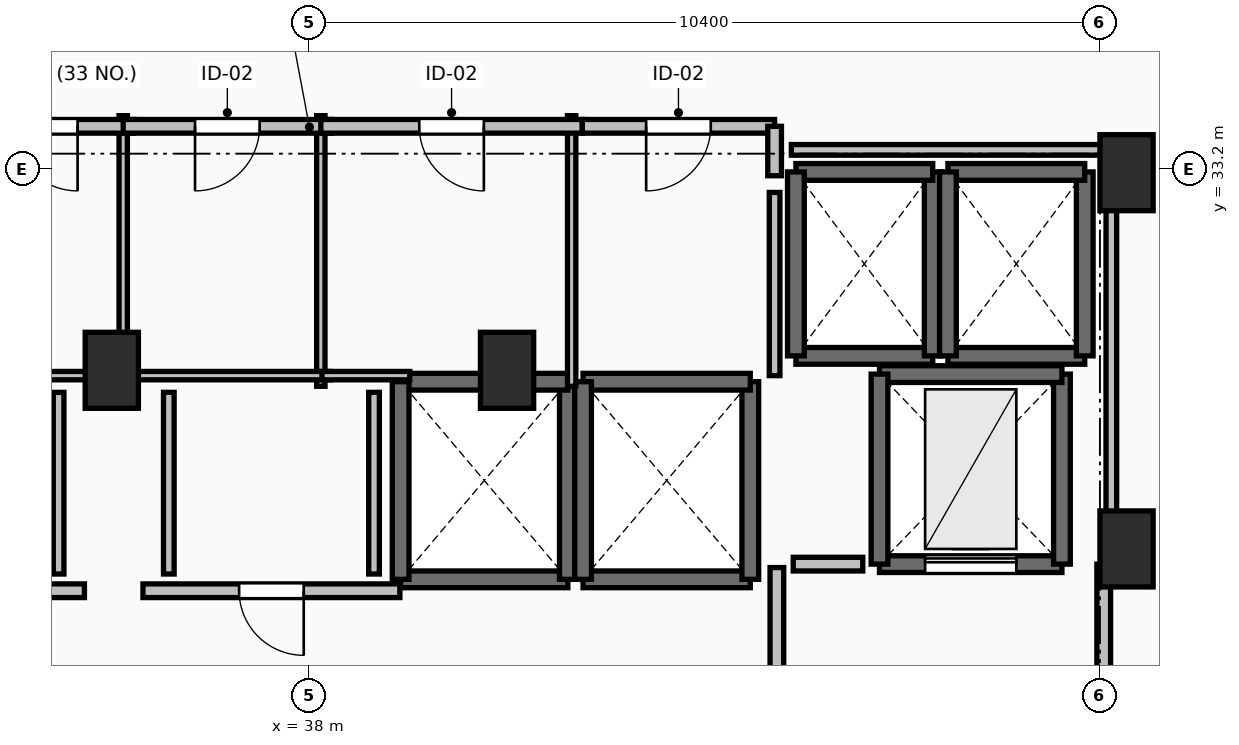
"""IFC4 building model, lengths in metres.
Left out: names, types, materials, properties, quantities, classifications, styles, units other than length and angle.
Written with IfcOpenShell. Run it as: python <this file> out.ifc"""

import sys

from ifc_helpers import new_model, si_unit, direction, frame, frame_2d, origin, origin_2d, place, context, subcontext, project, spatial, rectangle, extrude, element, fill, save


model = new_model("IFC4")
c1 = context("Model", 3, precision=1e-05, world=origin(), true_north=direction((0.0, 1.0)))
c2 = subcontext(c1, "Body", "Model", "MODEL_VIEW")
j1 = project(units=[si_unit("LENGTHUNIT", "METRE"), si_unit("PLANEANGLEUNIT", "RADIAN")], contexts=[c1])
p1 = place(None, origin())
s1 = spatial("IfcSite", under=j1, at=p1, CompositionType="ELEMENT")
p2 = place(p1, origin())
s2 = spatial("IfcBuilding", under=s1, at=p2, CompositionType="ELEMENT")
p3 = place(p2, frame((0.0, 0.0, 217.85)))
s3 = spatial("IfcBuildingStorey", under=s2, at=p3, CompositionType="ELEMENT", Elevation=217.85)
for number, where, z_axis, x_axis in (
    (1, (48.75, 33.15, 0.0), (0.0, 0.0, 1.0), (1.0, 0.0, 0.0)),
    (2, (48.75, 28.2, 0.0), (0.0, 0.0, 1.0), (1.0, 0.0, 0.0)),
    (3, (35.4, 30.55, 0.0), (0.0, 0.0, 1.0), (1.0, 0.0, 0.0)),
    (4, (40.6, 30.55, 0.0), (0.0, 0.0, 1.0), (1.0, 0.0, 0.0)),
):
    element("IfcColumn", number, at=place(p3, frame(where, z_axis=z_axis, x_axis=x_axis)), inside=s3, PredefinedType="PILASTER", context=c2, shape_type="SweptSolid", body=[
        extrude(rectangle(XDim=0.7, YDim=1.0, at=origin_2d()), origin(), (0.0, 0.0, 1.0), 3.55),
    ])
p4 = place(p3, frame((39.2, 27.8, 0.0), z_axis=(0.0, 0.0, 1.0), x_axis=(1.0, 0.0, 0.0)))
e5 = element("IfcWall", 5, at=p4, inside=s3, PredefinedType="SOLIDWALL", context=c2, shape_type="SweptSolid", body=[
    extrude(rectangle(XDim=2.2, YDim=0.22, at=frame_2d((1.1, 0.0))), origin(), (0.0, 0.0, 1.0), 3.29),
])
p5 = place(p3, frame((41.4, 27.8, 0.0), z_axis=(0.0, 0.0, 1.0), x_axis=(0.0, 1.0, 0.0)))
e6 = element("IfcWall", 6, at=p5, inside=s3, PredefinedType="SOLIDWALL", context=c2, shape_type="SweptSolid", body=[
    extrude(rectangle(XDim=2.6, YDim=0.22, at=frame_2d((1.3, 0.0))), origin(), (0.0, 0.0, 1.0), 3.29),
])
p6 = place(p3, frame((41.4, 30.4, 0.0), z_axis=(0.0, 0.0, 1.0), x_axis=(-1.0, 0.0, 0.0)))
e7 = element("IfcWall", 7, at=p6, inside=s3, PredefinedType="SOLIDWALL", context=c2, shape_type="SweptSolid", body=[
    extrude(rectangle(XDim=2.2, YDim=0.22, at=frame_2d((1.1, 0.0))), origin(), (0.0, 0.0, 1.0), 3.29),
])
p7 = place(p3, frame((39.2, 30.4, 0.0), z_axis=(0.0, 0.0, 1.0), x_axis=(0.0, -1.0, 0.0)))
e8 = element("IfcWall", 8, at=p7, inside=s3, PredefinedType="SOLIDWALL", context=c2, shape_type="SweptSolid", body=[
    extrude(rectangle(XDim=2.6, YDim=0.22, at=frame_2d((1.3, 0.0))), origin(), (0.0, 0.0, 1.0), 3.29),
])
p8 = place(p3, frame((41.6, 27.8, 0.0), z_axis=(0.0, 0.0, 1.0), x_axis=(1.0, 0.0, 0.0)))
e9 = element("IfcWall", 9, at=p8, inside=s3, PredefinedType="SOLIDWALL", context=c2, shape_type="SweptSolid", body=[
    extrude(rectangle(XDim=2.2, YDim=0.22, at=frame_2d((1.1, 0.0))), origin(), (0.0, 0.0, 1.0), 3.29),
])
p9 = place(p3, frame((43.8, 27.8, 0.0), z_axis=(0.0, 0.0, 1.0), x_axis=(0.0, 1.0, 0.0)))
e10 = element("IfcWall", 10, at=p9, inside=s3, PredefinedType="SOLIDWALL", context=c2, shape_type="SweptSolid", body=[
    extrude(rectangle(XDim=2.6, YDim=0.22, at=frame_2d((1.3, 0.0))), origin(), (0.0, 0.0, 1.0), 3.29),
])
p10 = place(p3, frame((43.8, 30.4, 0.0), z_axis=(0.0, 0.0, 1.0), x_axis=(-1.0, 0.0, 0.0)))
e11 = element("IfcWall", 11, at=p10, inside=s3, PredefinedType="SOLIDWALL", context=c2, shape_type="SweptSolid", body=[
    extrude(rectangle(XDim=2.2, YDim=0.22, at=frame_2d((1.1, 0.0))), origin(), (0.0, 0.0, 1.0), 3.29),
])
p11 = place(p3, frame((41.6, 30.4, 0.0), z_axis=(0.0, 0.0, 1.0), x_axis=(0.0, -1.0, 0.0)))
e12 = element("IfcWall", 12, at=p11, inside=s3, PredefinedType="SOLIDWALL", context=c2, shape_type="SweptSolid", body=[
    extrude(rectangle(XDim=2.6, YDim=0.22, at=frame_2d((1.3, 0.0))), origin(), (0.0, 0.0, 1.0), 3.29),
])
p12 = place(p3, frame((44.4, 30.74, 0.0), z_axis=(0.0, 0.0, 1.0), x_axis=(1.0, 0.0, 0.0)))
e13 = element("IfcWall", 13, at=p12, inside=s3, PredefinedType="SOLIDWALL", context=c2, shape_type="SweptSolid", body=[
    extrude(rectangle(XDim=1.8, YDim=0.22, at=frame_2d((0.9, 0.0))), origin(), (0.0, 0.0, 1.0), 3.29),
])
p13 = place(p3, frame((46.2, 30.74, 0.0), z_axis=(0.0, 0.0, 1.0), x_axis=(0.0, 1.0, 0.0)))
e14 = element("IfcWall", 14, at=p13, inside=s3, PredefinedType="SOLIDWALL", context=c2, shape_type="SweptSolid", body=[
    extrude(rectangle(XDim=2.42, YDim=0.22, at=frame_2d((1.21, 0.0))), origin(), (0.0, 0.0, 1.0), 3.29),
])
p14 = place(p3, frame((46.2, 33.16, 0.0), z_axis=(0.0, 0.0, 1.0), x_axis=(-1.0, 0.0, 0.0)))
e15 = element("IfcWall", 15, at=p14, inside=s3, PredefinedType="SOLIDWALL", context=c2, shape_type="SweptSolid", body=[
    extrude(rectangle(XDim=1.8, YDim=0.22, at=frame_2d((0.9, 0.0))), origin(), (0.0, 0.0, 1.0), 3.29),
])
p15 = place(p3, frame((44.4, 33.16, 0.0), z_axis=(0.0, 0.0, 1.0), x_axis=(0.0, -1.0, 0.0)))
e16 = element("IfcWall", 16, at=p15, inside=s3, PredefinedType="SOLIDWALL", context=c2, shape_type="SweptSolid", body=[
    extrude(rectangle(XDim=2.42, YDim=0.22, at=frame_2d((1.21, 0.0))), origin(), (0.0, 0.0, 1.0), 3.29),
])
p16 = place(p3, frame((46.4, 30.74, 0.0), z_axis=(0.0, 0.0, 1.0), x_axis=(1.0, 0.0, 0.0)))
e17 = element("IfcWall", 17, at=p16, inside=s3, PredefinedType="SOLIDWALL", context=c2, shape_type="SweptSolid", body=[
    extrude(rectangle(XDim=1.8, YDim=0.22, at=frame_2d((0.9, 0.0))), origin(), (0.0, 0.0, 1.0), 3.29),
])
p17 = place(p3, frame((48.2, 30.74, 0.0), z_axis=(0.0, 0.0, 1.0), x_axis=(0.0, 1.0, 0.0)))
e18 = element("IfcWall", 18, at=p17, inside=s3, PredefinedType="SOLIDWALL", context=c2, shape_type="SweptSolid", body=[
    extrude(rectangle(XDim=2.42, YDim=0.22, at=frame_2d((1.21, 0.0))), origin(), (0.0, 0.0, 1.0), 3.29),
])
p18 = place(p3, frame((48.2, 33.16, 0.0), z_axis=(0.0, 0.0, 1.0), x_axis=(-1.0, 0.0, 0.0)))
e19 = element("IfcWall", 19, at=p18, inside=s3, PredefinedType="SOLIDWALL", context=c2, shape_type="SweptSolid", body=[
    extrude(rectangle(XDim=1.8, YDim=0.22, at=frame_2d((0.9, 0.0))), origin(), (0.0, 0.0, 1.0), 3.29),
])
p19 = place(p3, frame((46.4, 33.16, 0.0), z_axis=(0.0, 0.0, 1.0), x_axis=(0.0, -1.0, 0.0)))
e20 = element("IfcWall", 20, at=p19, inside=s3, PredefinedType="SOLIDWALL", context=c2, shape_type="SweptSolid", body=[
    extrude(rectangle(XDim=2.42, YDim=0.22, at=frame_2d((1.21, 0.0))), origin(), (0.0, 0.0, 1.0), 3.29),
])
p20 = place(p3, frame((45.5, 28.0, 0.0), z_axis=(0.0, 0.0, 1.0), x_axis=(1.0, 0.0, 0.0)))
e21 = element("IfcWall", 21, at=p20, inside=s3, PredefinedType="SHEAR", context=c2, shape_type="SweptSolid", body=[
    extrude(rectangle(XDim=2.4, YDim=0.22, at=frame_2d((1.2, 0.0))), origin(), (0.0, 0.0, 1.0), 3.29),
])
p21 = place(p20, frame((0.6, 0.0, 0.0)))
e22 = element("IfcOpeningElement", 22, at=p21, cuts=e21, PredefinedType="OPENING", context=c2, shape_type="SweptSolid", body=[
    extrude(rectangle(XDim=1.2, YDim=2.2, at=frame_2d((0.6, 1.1))), frame((0.0, 0.125, 0.0), z_axis=(0.0, -1.0, 0.0), x_axis=(1.0, 0.0, 0.0)), (0.0, 0.0, 1.0), 0.25),
])
p22 = place(p3, frame((47.9, 28.0, 0.0), z_axis=(0.0, 0.0, 1.0), x_axis=(0.0, 1.0, 0.0)))
e23 = element("IfcWall", 23, at=p22, inside=s3, PredefinedType="SHEAR", context=c2, shape_type="SweptSolid", body=[
    extrude(rectangle(XDim=2.5, YDim=0.22, at=frame_2d((1.25, 0.0))), origin(), (0.0, 0.0, 1.0), 3.29),
])
p23 = place(p3, frame((47.9, 30.5, 0.0), z_axis=(0.0, 0.0, 1.0), x_axis=(-1.0, 0.0, 0.0)))
e24 = element("IfcWall", 24, at=p23, inside=s3, PredefinedType="SHEAR", context=c2, shape_type="SweptSolid", body=[
    extrude(rectangle(XDim=2.4, YDim=0.22, at=frame_2d((1.2, 0.0))), origin(), (0.0, 0.0, 1.0), 3.29),
])
p24 = place(p3, frame((45.5, 30.5, 0.0), z_axis=(0.0, 0.0, 1.0), x_axis=(0.0, -1.0, 0.0)))
e25 = element("IfcWall", 25, at=p24, inside=s3, PredefinedType="SHEAR", context=c2, shape_type="SweptSolid", body=[
    extrude(rectangle(XDim=2.5, YDim=0.22, at=frame_2d((1.25, 0.0))), origin(), (0.0, 0.0, 1.0), 3.29),
])
p25 = place(p3, frame((44.15, 27.955, 0.0), z_axis=(0.0, 0.0, 1.0), x_axis=(0.0, -1.0, 0.0)))
e26 = element("IfcWall", 26, at=p25, inside=s3, PredefinedType="PARTITIONING", context=c2, shape_type="SweptSolid", body=[
    extrude(rectangle(XDim=3.91, YDim=0.18, at=frame_2d((1.955, 0.0))), origin(), (0.0, 0.0, 1.0), 3.29),
])
p26 = place(p25, frame((1.355, 0.0, 0.0)))
e27 = element("IfcOpeningElement", 27, at=p26, cuts=e26, PredefinedType="OPENING", context=c2, shape_type="SweptSolid", body=[
    extrude(rectangle(XDim=1.2, YDim=2.15, at=frame_2d((0.6, 1.075))), frame((0.0, 0.105, 0.0), z_axis=(0.0, -1.0, 0.0), x_axis=(1.0, 0.0, 0.0)), (0.0, 0.0, 1.0), 0.21),
])
p27 = place(p3, frame((48.45, 23.95, 0.0), z_axis=(0.0, 0.0, 1.0), x_axis=(0.0, 1.0, 0.0)))
e28 = element("IfcWall", 28, at=p27, inside=s3, PredefinedType="PARTITIONING", context=c2, shape_type="SweptSolid", body=[
    extrude(rectangle(XDim=4.05, YDim=0.18, at=frame_2d((2.025, 0.0))), origin(), (0.0, 0.0, 1.0), 3.29),
])
p28 = place(p27, frame((1.425, 0.0, 0.0)))
e29 = element("IfcOpeningElement", 29, at=p28, cuts=e28, PredefinedType="OPENING", context=c2, shape_type="SweptSolid", body=[
    extrude(rectangle(XDim=1.2, YDim=2.15, at=frame_2d((0.6, 1.075))), frame((0.0, 0.105, 0.0), z_axis=(0.0, -1.0, 0.0), x_axis=(1.0, 0.0, 0.0)), (0.0, 0.0, 1.0), 0.21),
])
p29 = place(p3, frame((35.04, 27.65, 0.0), z_axis=(0.0, 0.0, 1.0), x_axis=(-1.0, 0.0, 0.0)))
e30 = element("IfcWall", 30, at=p29, inside=s3, PredefinedType="PARTITIONING", context=c2, shape_type="SweptSolid", body=[
    extrude(rectangle(XDim=3.04, YDim=0.18, at=frame_2d((1.52, 0.0))), origin(), (0.0, 0.0, 1.0), 3.29),
])
p30 = place(p29, frame((1.02, 0.0, 0.0)))
e31 = element("IfcOpeningElement", 31, at=p30, cuts=e30, PredefinedType="OPENING", context=c2, shape_type="SweptSolid", body=[
    extrude(rectangle(XDim=1.0, YDim=2.15, at=frame_2d((0.5, 1.075))), frame((0.0, 0.105, 0.0), z_axis=(0.0, -1.0, 0.0), x_axis=(1.0, 0.0, 0.0)), (0.0, 0.0, 1.0), 0.21),
])
p31 = place(p3, frame((39.19, 27.65, 0.0), z_axis=(0.0, 0.0, 1.0), x_axis=(-1.0, 0.0, 0.0)))
e32 = element("IfcWall", 32, at=p31, inside=s3, PredefinedType="PARTITIONING", context=c2, shape_type="SweptSolid", body=[
    extrude(rectangle(XDim=3.38, YDim=0.18, at=frame_2d((1.69, 0.0))), origin(), (0.0, 0.0, 1.0), 3.29),
])
p32 = place(p31, frame((1.265, 0.0, 0.0)))
e33 = element("IfcOpeningElement", 33, at=p32, cuts=e32, PredefinedType="OPENING", context=c2, shape_type="SweptSolid", body=[
    extrude(rectangle(XDim=0.85, YDim=2.1, at=frame_2d((0.425, 1.05))), frame((0.0, 0.105, 0.0), z_axis=(0.0, -1.0, 0.0), x_axis=(1.0, 0.0, 0.0)), (0.0, 0.0, 1.0), 0.21),
])
p33 = place(p3, frame((35.55, 30.34, 0.0), z_axis=(0.0, 0.0, 1.0), x_axis=(0.0, 1.0, 0.0)))
e34 = element("IfcWall", 34, at=p33, inside=s3, PredefinedType="PARTITIONING", context=c2, shape_type="SweptSolid", body=[
    extrude(rectangle(XDim=3.56, YDim=0.11, at=frame_2d((1.78, 0.0))), origin(), (0.0, 0.0, 1.0), 2.482),
])
p34 = place(p3, frame((33.36, 30.48, 0.0), z_axis=(0.0, 0.0, 1.0), x_axis=(1.0, 0.0, 0.0)))
e35 = element("IfcWall", 35, at=p34, inside=s3, PredefinedType="PARTITIONING", context=c2, shape_type="SweptSolid", body=[
    extrude(rectangle(XDim=1.81, YDim=0.11, at=frame_2d((0.905, 0.0))), origin(), (0.0, 0.0, 1.0), 3.29),
])
p35 = place(p3, frame((35.69, 33.76, 0.0), z_axis=(0.0, 0.0, 1.0), x_axis=(-1.0, 0.0, 0.0)))
e36 = element("IfcWall", 36, at=p35, inside=s3, PredefinedType="PARTITIONING", context=c2, shape_type="SweptSolid", body=[
    extrude(rectangle(XDim=2.33, YDim=0.18, at=frame_2d((1.165, 0.0))), origin(), (0.0, 0.0, 1.0), 3.29),
])
p36 = place(p35, frame((0.74, 0.0, 0.0)))
e37 = element("IfcOpeningElement", 37, at=p36, cuts=e36, PredefinedType="OPENING", context=c2, shape_type="SweptSolid", body=[
    extrude(rectangle(XDim=0.85, YDim=2.1, at=frame_2d((0.425, 1.05))), frame((0.0, 0.105, 0.0), z_axis=(0.0, -1.0, 0.0), x_axis=(1.0, 0.0, 0.0)), (0.0, 0.0, 1.0), 0.21),
])
p37 = place(p3, frame((38.15, 30.34, 0.0), z_axis=(0.0, 0.0, 1.0), x_axis=(0.0, 1.0, 0.0)))
e38 = element("IfcWall", 38, at=p37, inside=s3, PredefinedType="PARTITIONING", context=c2, shape_type="SweptSolid", body=[
    extrude(rectangle(XDim=3.56, YDim=0.11, at=frame_2d((1.78, 0.0))), origin(), (0.0, 0.0, 1.0), 2.482),
])
p38 = place(p3, frame((35.68, 30.48, 0.0), z_axis=(0.0, 0.0, 1.0), x_axis=(1.0, 0.0, 0.0)))
e39 = element("IfcWall", 39, at=p38, inside=s3, PredefinedType="PARTITIONING", context=c2, shape_type="SweptSolid", body=[
    extrude(rectangle(XDim=2.595, YDim=0.11, at=frame_2d((1.297, 0.0))), origin(), (0.0, 0.0, 1.0), 2.482),
])
p39 = place(p3, frame((38.29, 33.76, 0.0), z_axis=(0.0, 0.0, 1.0), x_axis=(-1.0, 0.0, 0.0)))
e40 = element("IfcWall", 40, at=p39, inside=s3, PredefinedType="PARTITIONING", context=c2, shape_type="SweptSolid", body=[
    extrude(rectangle(XDim=2.74, YDim=0.18, at=frame_2d((1.37, 0.0))), origin(), (0.0, 0.0, 1.0), 3.29),
])
p40 = place(p39, frame((0.945, 0.0, 0.0)))
e41 = element("IfcOpeningElement", 41, at=p40, cuts=e40, PredefinedType="OPENING", context=c2, shape_type="SweptSolid", body=[
    extrude(rectangle(XDim=0.85, YDim=2.1, at=frame_2d((0.425, 1.05))), frame((0.0, 0.105, 0.0), z_axis=(0.0, -1.0, 0.0), x_axis=(1.0, 0.0, 0.0)), (0.0, 0.0, 1.0), 0.21),
])
p41 = place(p3, frame((41.45, 30.34, 0.0), z_axis=(0.0, 0.0, 1.0), x_axis=(0.0, 1.0, 0.0)))
e42 = element("IfcWall", 42, at=p41, inside=s3, PredefinedType="PARTITIONING", context=c2, shape_type="SweptSolid", body=[
    extrude(rectangle(XDim=3.56, YDim=0.11, at=frame_2d((1.78, 0.0))), origin(), (0.0, 0.0, 1.0), 3.29),
])
p42 = place(p3, frame((38.165, 30.48, 0.0), z_axis=(0.0, 0.0, 1.0), x_axis=(1.0, 0.0, 0.0)))
e43 = element("IfcWall", 43, at=p42, inside=s3, PredefinedType="PARTITIONING", context=c2, shape_type="SweptSolid", body=[
    extrude(rectangle(XDim=1.155, YDim=0.11, at=frame_2d((0.578, 0.0))), origin(), (0.0, 0.0, 1.0), 2.482),
])
p43 = place(p3, frame((41.59, 33.76, 0.0), z_axis=(0.0, 0.0, 1.0), x_axis=(-1.0, 0.0, 0.0)))
e44 = element("IfcWall", 44, at=p43, inside=s3, PredefinedType="PARTITIONING", context=c2, shape_type="SweptSolid", body=[
    extrude(rectangle(XDim=3.44, YDim=0.18, at=frame_2d((1.72, 0.0))), origin(), (0.0, 0.0, 1.0), 3.29),
])
p44 = place(p43, frame((1.295, 0.0, 0.0)))
e45 = element("IfcOpeningElement", 45, at=p44, cuts=e44, PredefinedType="OPENING", context=c2, shape_type="SweptSolid", body=[
    extrude(rectangle(XDim=0.85, YDim=2.1, at=frame_2d((0.425, 1.05))), frame((0.0, 0.105, 0.0), z_axis=(0.0, -1.0, 0.0), x_axis=(1.0, 0.0, 0.0)), (0.0, 0.0, 1.0), 0.21),
])
p45 = place(p3, frame((44.12, 33.76, 0.0), z_axis=(0.0, 0.0, 1.0), x_axis=(-1.0, 0.0, 0.0)))
e46 = element("IfcWall", 46, at=p45, inside=s3, PredefinedType="PARTITIONING", context=c2, shape_type="SweptSolid", body=[
    extrude(rectangle(XDim=2.53, YDim=0.18, at=frame_2d((1.265, 0.0))), origin(), (0.0, 0.0, 1.0), 3.29),
])
p46 = place(p45, frame((0.84, 0.0, 0.0)))
e47 = element("IfcOpeningElement", 47, at=p46, cuts=e46, PredefinedType="OPENING", context=c2, shape_type="SweptSolid", body=[
    extrude(rectangle(XDim=0.85, YDim=2.1, at=frame_2d((0.425, 1.05))), frame((0.0, 0.105, 0.0), z_axis=(0.0, -1.0, 0.0), x_axis=(1.0, 0.0, 0.0)), (0.0, 0.0, 1.0), 0.21),
])
p47 = place(p3, frame((44.12, 33.11, 0.0), z_axis=(0.0, 0.0, 1.0), x_axis=(0.0, 1.0, 0.0)))
e48 = element("IfcWall", 48, at=p47, inside=s3, PredefinedType="PARTITIONING", context=c2, shape_type="SweptSolid", body=[
    extrude(rectangle(XDim=0.65, YDim=0.18, at=frame_2d((0.325, 0.0))), origin(), (0.0, 0.0, 1.0), 3.29),
])
p48 = place(p3, frame((45.28, 28.0, 0.0), z_axis=(0.0, 0.0, 1.0), x_axis=(-1.0, 0.0, 0.0)))
e49 = element("IfcWall", 49, at=p48, inside=s3, PredefinedType="PARTITIONING", context=c2, shape_type="SweptSolid", body=[
    extrude(rectangle(XDim=0.915, YDim=0.18, at=frame_2d((0.458, 0.0))), origin(), (0.0, 0.0, 1.0), 3.29),
])
p49 = place(p3, frame((44.12, 30.48, 0.0), z_axis=(0.0, 0.0, 1.0), x_axis=(0.0, 1.0, 0.0)))
e50 = element("IfcWall", 50, at=p49, inside=s3, PredefinedType="PARTITIONING", context=c2, shape_type="SweptSolid", body=[
    extrude(rectangle(XDim=2.41, YDim=0.14, at=frame_2d((1.205, 0.0))), origin(), (0.0, 0.0, 1.0), 3.29),
])
for number, where, z_axis, x_axis in (
    (51, (34.7, 27.87, 0.0), (0.0, 0.0, 1.0), (0.0, 1.0, 0.0)),
    (52, (36.15, 30.26, 0.0), (0.0, 0.0, 1.0), (0.0, -1.0, 0.0)),
    (53, (38.85, 27.87, 0.0), (0.0, 0.0, 1.0), (0.0, 1.0, 0.0)),
):
    element("IfcWall", number, at=place(p3, frame(where, z_axis=z_axis, x_axis=x_axis)), inside=s3, PredefinedType="PARTITIONING", context=c2, shape_type="SweptSolid", body=[
        extrude(rectangle(XDim=2.39, YDim=0.14, at=frame_2d((1.195, 0.0))), origin(), (0.0, 0.0, 1.0), 3.29),
    ])
p50 = place(p3, frame((48.55, 28.196, 0.0), z_axis=(0.0, 0.0, 1.0), x_axis=(0.0, 1.0, 0.0)))
e54 = element("IfcWall", 54, at=p50, inside=s3, PredefinedType="PARTITIONING", context=c2, shape_type="SweptSolid", body=[
    extrude(rectangle(XDim=5.254, YDim=0.14, at=frame_2d((2.627, 0.0))), origin(), (0.0, 0.0, 1.0), 2.482),
])
p51 = place(p3, frame((48.55, 33.45, 0.0), z_axis=(0.0, 0.0, 1.0), x_axis=(-1.0, 0.0, 0.0)))
e55 = element("IfcWall", 55, at=p51, inside=s3, PredefinedType="PARTITIONING", context=c2, shape_type="SweptSolid", body=[
    extrude(rectangle(XDim=4.21, YDim=0.14, at=frame_2d((2.105, 0.0))), origin(), (0.0, 0.0, 1.0), 2.482),
])
p52 = place(p21, origin())
e56 = element("IfcDoor", 56, at=p52, inside=s3, OperationType="SLIDING_TO_LEFT", PredefinedType="DOOR", context=c2, shape_type="SweptSolid", body=[
    extrude(rectangle(XDim=1.2, YDim=2.2, at=frame_2d((0.6, 1.1))), frame((0.0, 0.025, 0.0), z_axis=(0.0, -1.0, 0.0), x_axis=(1.0, 0.0, 0.0)), (0.0, 0.0, 1.0), 0.05),
])
fill(e22, e56)
p53 = place(p32, origin())
e57 = element("IfcDoor", 57, at=p53, inside=s3, OperationType="SINGLE_SWING_LEFT", PredefinedType="DOOR", context=c2, shape_type="SweptSolid", body=[
    extrude(rectangle(XDim=0.85, YDim=2.1, at=frame_2d((0.425, 1.05))), frame((0.0, 0.025, 0.0), z_axis=(0.0, -1.0, 0.0), x_axis=(1.0, 0.0, 0.0)), (0.0, 0.0, 1.0), 0.05),
])
fill(e33, e57)
p54 = place(p36, origin())
e58 = element("IfcDoor", 58, at=p54, inside=s3, OperationType="SINGLE_SWING_LEFT", PredefinedType="DOOR", context=c2, shape_type="SweptSolid", body=[
    extrude(rectangle(XDim=0.85, YDim=2.1, at=frame_2d((0.425, 1.05))), frame((0.0, 0.025, 0.0), z_axis=(0.0, -1.0, 0.0), x_axis=(1.0, 0.0, 0.0)), (0.0, 0.0, 1.0), 0.05),
])
fill(e37, e58)
p55 = place(p40, origin())
e59 = element("IfcDoor", 59, at=p55, inside=s3, OperationType="SINGLE_SWING_RIGHT", PredefinedType="DOOR", context=c2, shape_type="SweptSolid", body=[
    extrude(rectangle(XDim=0.85, YDim=2.1, at=frame_2d((0.425, 1.05))), frame((0.0, 0.025, 0.0), z_axis=(0.0, -1.0, 0.0), x_axis=(1.0, 0.0, 0.0)), (0.0, 0.0, 1.0), 0.05),
])
fill(e41, e59)
p56 = place(p44, origin())
e60 = element("IfcDoor", 60, at=p56, inside=s3, OperationType="SINGLE_SWING_LEFT", PredefinedType="DOOR", context=c2, shape_type="SweptSolid", body=[
    extrude(rectangle(XDim=0.85, YDim=2.1, at=frame_2d((0.425, 1.05))), frame((0.0, 0.025, 0.0), z_axis=(0.0, -1.0, 0.0), x_axis=(1.0, 0.0, 0.0)), (0.0, 0.0, 1.0), 0.05),
])
fill(e45, e60)
p57 = place(p46, origin())
e61 = element("IfcDoor", 61, at=p57, inside=s3, OperationType="SINGLE_SWING_RIGHT", PredefinedType="DOOR", context=c2, shape_type="SweptSolid", body=[
    extrude(rectangle(XDim=0.85, YDim=2.1, at=frame_2d((0.425, 1.05))), frame((0.0, 0.025, 0.0), z_axis=(0.0, -1.0, 0.0), x_axis=(1.0, 0.0, 0.0)), (0.0, 0.0, 1.0), 0.05),
])
fill(e47, e61)
save(model, sys.argv[1])
